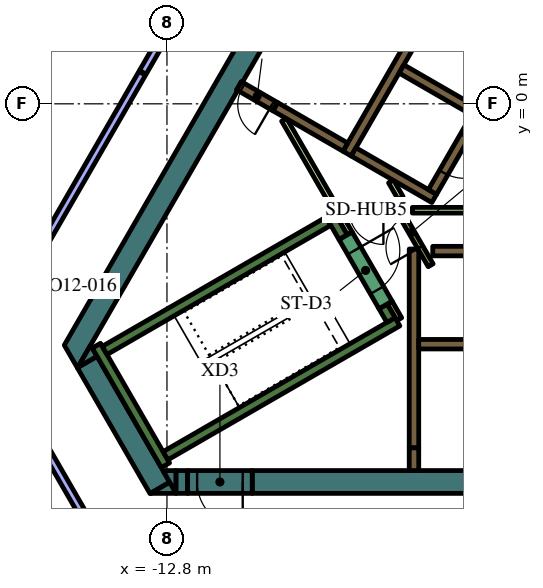
"""IFC4 building model, lengths in metres.
Left out: names, types, materials, properties, quantities, classifications, styles, units other than length and angle.
Written with IfcOpenShell. Run it as: python <this file> out.ifc"""

import sys

from ifc_helpers import new_model, si_unit, direction, frame, frame_2d, origin, place, context, subcontext, project, spatial, polyline, rectangle, outline, extrude, element, fill, save


model = new_model("IFC4")
c1 = context("Model", 3, precision=1e-05, world=origin(), true_north=direction((0.0, 1.0)))
c2 = subcontext(c1, "Body", "Model", "MODEL_VIEW")
j1 = project(units=[si_unit("LENGTHUNIT", "METRE"), si_unit("PLANEANGLEUNIT", "RADIAN")], contexts=[c1])
p1 = place(None, origin())
s1 = spatial("IfcSite", under=j1, at=p1, CompositionType="ELEMENT")
p2 = place(p1, origin())
s2 = spatial("IfcBuilding", under=s1, at=p2, CompositionType="ELEMENT")
p3 = place(p2, frame((0.0, 0.0, 288.0)))
s3 = spatial("IfcBuildingStorey", under=s2, at=p3, CompositionType="ELEMENT", Elevation=288.0)
p4 = place(p3, origin())
e1 = element("IfcWall", 1, at=p4, inside=s3, PredefinedType="SOLIDWALL", context=c2, shape_type="SweptSolid", body=[
    extrude(outline(polyline([(-15.502, -6.35), (-4.912, 11.992), (-4.393, 11.692), (-10.815, 0.569), (-10.84, 0.583), (-10.84, 0.583), (-10.84, 0.583), (-10.965, 0.367), (-10.965, 0.367), (-10.965, 0.367), (-10.94, 0.352), (-11.033, 0.191), (-14.809, -6.35), (-15.156, -6.95), (-15.502, -6.35)])), origin(), (0.0, 0.0, 1.0), 4.2),
])
p5 = place(p3, frame((-14.899, -6.795, 0.0), z_axis=(0.0, 0.0, 1.0), x_axis=(0.499950938802, -0.866053727428, 0.0)))
e2 = element("IfcWall", 2, at=p5, inside=s3, PredefinedType="SOLIDWALL", context=c2, shape_type="SweptSolid", body=[
    extrude(rectangle(XDim=3.823, YDim=0.6, at=frame_2d((1.912, 0.0))), origin(), (0.0, 0.0, 1.0), 4.2),
])
e3 = element("IfcWall", 3, at=p4, inside=s3, PredefinedType="SOLIDWALL", context=c2, shape_type="SweptSolid", body=[
    extrude(outline(polyline([(-14.64, -6.643), (-15.147, -6.936), (-14.809, -6.35), (-14.64, -6.643)])), origin(), (0.0, 0.0, 1.0), 4.2),
])
e4 = element("IfcWall", 4, at=p4, inside=s3, PredefinedType="SOLIDWALL", context=c2, shape_type="SweptSolid", body=[
    extrude(outline(polyline([(-12.557, -10.25), (-13.233, -10.25), (-12.726, -9.957), (-12.557, -10.25)])), origin(), (0.0, 0.0, 1.0), 4.2),
])
p6 = place(p3, frame((-12.257, -9.95, 0.0), z_axis=(0.0, 0.0, 1.0), x_axis=(-1.0, 0.0, 0.0)))
e5 = element("IfcWall", 5, at=p6, inside=s3, PredefinedType="SOLIDWALL", context=c2, shape_type="SweptSolid", body=[
    extrude(rectangle(XDim=0.307, YDim=0.6, at=frame_2d((0.154, 0.0))), origin(), (0.0, 0.0, 1.0), 4.2),
])
e6 = element("IfcWall", 6, at=p4, inside=s3, PredefinedType="SOLIDWALL", context=c2, shape_type="SweptSolid", body=[
    extrude(outline(polyline([(-12.904, -9.65), (-12.566, -9.65), (-12.566, -10.236), (-12.904, -9.65)])), origin(), (0.0, 0.0, 1.0), 4.2),
])
p7 = place(p3, frame((-10.556, -9.95, 0.0), z_axis=(0.0, 0.0, 1.0), x_axis=(1.0, 0.0, 0.0)))
e7 = element("IfcWall", 7, at=p7, inside=s3, PredefinedType="SOLIDWALL", context=c2, shape_type="SweptSolid", body=[
    extrude(rectangle(XDim=19.461, YDim=0.6, at=frame_2d((9.73, 0.0))), origin(), (0.0, 0.0, 1.0), 4.2),
])
p8 = place(p3, frame((-12.84, -9.511, 0.0), z_axis=(0.0, 0.0, 1.0), x_axis=(-0.499997733992, 0.866026712061, 0.0)))
e8 = element("IfcWall", 8, at=p8, inside=s3, PredefinedType="SOLIDWALL", context=c2, shape_type="SweptSolid", body=[
    extrude(rectangle(XDim=3.634, YDim=0.25, at=frame_2d((1.817, 0.0))), origin(), (0.0, 0.0, 1.0), 4.2),
])
p9 = place(p3, frame((-14.44, -6.49, 0.0), z_axis=(0.0, 0.0, 1.0), x_axis=(0.866022966069, 0.500004222222, 0.0)))
e9 = element("IfcWall", 9, at=p9, inside=s3, PredefinedType="SOLIDWALL", context=c2, shape_type="SweptSolid", body=[
    extrude(rectangle(XDim=6.8, YDim=0.25, at=frame_2d((3.4, 0.0))), origin(), (0.0, 0.0, 1.0), 4.2),
])
p10 = place(p3, frame((-8.163, -3.511, 0.0), z_axis=(0.0, 0.0, 1.0), x_axis=(-0.499994068514, 0.866028828302, 0.0)))
e10 = element("IfcWall", 10, at=p10, inside=s3, PredefinedType="SOLIDWALL", context=c2, shape_type="SweptSolid", body=[
    extrude(rectangle(XDim=0.674, YDim=0.25, at=frame_2d((0.337, 0.0))), origin(), (0.0, 0.0, 1.0), 4.2),
])
p11 = place(p3, frame((-12.84, -9.261, 0.0), z_axis=(0.0, 0.0, 1.0), x_axis=(0.866016039709, 0.500016218704, 0.0)))
e11 = element("IfcWall", 11, at=p11, inside=s3, PredefinedType="SOLIDWALL", context=c2, shape_type="SweptSolid", body=[
    extrude(rectangle(XDim=7.05, YDim=0.25, at=frame_2d((3.525, 0.0))), origin(), (0.0, 0.0, 1.0), 4.2),
])
p12 = place(p3, frame((-6.905, -5.69, 0.0), z_axis=(0.0, 0.0, 1.0), x_axis=(-0.499993700073, 0.866029041019, 0.0)))
e12 = element("IfcWall", 12, at=p12, inside=s3, PredefinedType="SOLIDWALL", context=c2, shape_type="SweptSolid", body=[
    extrude(rectangle(XDim=0.416, YDim=0.25, at=frame_2d((0.208, 0.0))), origin(), (0.0, 0.0, 1.0), 4.2),
])
p13 = place(p3, frame((-5.806, -3.875, 0.0), z_axis=(0.0, 0.0, 1.0), x_axis=(1.0, 0.0, 0.0)))
e13 = element("IfcWall", 13, at=p13, inside=s3, PredefinedType="SOLIDWALL", context=c2, shape_type="SweptSolid", body=[
    extrude(rectangle(XDim=12.231, YDim=0.25, at=frame_2d((6.116, 0.0))), origin(), (0.0, 0.0, 1.0), 4.2),
])
p14 = place(p3, frame((-6.3, -9.05, 0.0), z_axis=(0.0, 0.0, 1.0), x_axis=(0.0, 1.0, 0.0)))
e14 = element("IfcWall", 14, at=p14, inside=s3, PredefinedType="SOLIDWALL", context=c2, shape_type="SweptSolid", body=[
    extrude(rectangle(XDim=5.23, YDim=0.25, at=frame_2d((2.615, 0.0))), origin(), (0.0, 0.0, 1.0), 4.2),
])
p15 = place(p3, frame((-6.3, -9.052, 0.0), z_axis=(0.0, 0.0, 1.0), x_axis=(0.0, -1.0, 0.0)))
e15 = element("IfcWall", 15, at=p15, inside=s3, PredefinedType="SOLIDWALL", context=c2, shape_type="SweptSolid", body=[
    extrude(rectangle(XDim=0.598, YDim=0.25, at=frame_2d((0.299, 0.0))), origin(), (0.0, 0.0, 1.0), 4.2),
])
p16 = place(p3, frame((-8.06, -1.311, 0.0), z_axis=(0.0, 0.0, 1.0), x_axis=(0.50000273126, 0.866023826885, 0.0)))
e16 = element("IfcWall", 16, at=p16, inside=s3, PredefinedType="SOLIDWALL", context=c2, shape_type="SweptSolid", body=[
    extrude(rectangle(XDim=10.33, YDim=0.25, at=frame_2d((5.165, 0.0))), origin(), (0.0, 0.0, 1.0), 4.2),
])
p17 = place(p3, frame((-4.724, -0.182, 0.0), z_axis=(0.0, 0.0, 1.0), x_axis=(-0.866008176907, 0.50002983664, 0.0)))
e17 = element("IfcWall", 17, at=p17, inside=s3, PredefinedType="SOLIDWALL", context=c2, shape_type="SweptSolid", body=[
    extrude(rectangle(XDim=2.2, YDim=0.25, at=frame_2d((1.1, 0.0))), origin(), (0.0, 0.0, 1.0), 4.2),
])
p18 = place(p3, frame((-7.889, -1.265, 0.0), z_axis=(0.0, 0.0, 1.0), x_axis=(0.866057815567, -0.499943856944, 0.0)))
e18 = element("IfcWall", 18, at=p18, inside=s3, PredefinedType="SOLIDWALL", context=c2, shape_type="SweptSolid", body=[
    extrude(rectangle(XDim=2.45, YDim=0.25, at=frame_2d((1.225, 0.0))), origin(), (0.0, 0.0, 1.0), 4.2),
])
p19 = place(p3, frame((-9.95, -0.075, 0.0), z_axis=(0.0, 0.0, 1.0), x_axis=(0.865962177421, -0.500109495288, 0.0)))
e19 = element("IfcWall", 19, at=p19, inside=s3, PredefinedType="SOLIDWALL", context=c2, shape_type="SweptSolid", body=[
    extrude(rectangle(XDim=2.129, YDim=0.25, at=frame_2d((1.065, 0.0))), origin(), (0.0, 0.0, 1.0), 4.2),
])
p20 = place(p3, frame((-9.718, -0.417, 0.0), z_axis=(0.0, 0.0, 1.0), x_axis=(0.499966538646, -0.866044721844, 0.0)))
e20 = element("IfcWall", 20, at=p20, inside=s3, PredefinedType="PARTITIONING", context=c2, shape_type="SweptSolid", body=[
    extrude(rectangle(XDim=2.511, YDim=0.15, at=frame_2d((1.255, 0.0))), origin(), (0.0, 0.0, 1.0), 3.55),
])
p21 = place(p3, frame((1.438, -2.8, 0.0), z_axis=(0.0, 0.0, 1.0), x_axis=(-1.0, 0.0, 0.0)))
e21 = element("IfcWall", 21, at=p21, inside=s3, PredefinedType="PARTITIONING", context=c2, shape_type="SweptSolid", body=[
    extrude(rectangle(XDim=7.781, YDim=0.15, at=frame_2d((3.891, 0.0))), origin(), (0.0, 0.0, 1.0), 3.55),
])
p22 = place(p3, frame((-6.653, -2.477, 0.0), z_axis=(0.0, 0.0, 1.0), x_axis=(-0.500002592159, 0.866023907196, 0.0)))
e22 = element("IfcWall", 22, at=p22, inside=s3, PredefinedType="PARTITIONING", context=c2, shape_type="SweptSolid", body=[
    extrude(rectangle(XDim=0.503, YDim=0.15, at=frame_2d((0.251, 0.0))), origin(), (0.0, 0.0, 1.0), 3.55),
])
p23 = place(p3, frame((-7.99, -3.412, 0.0), z_axis=(0.0, 0.0, 1.0), x_axis=(-0.499858525911, 0.866107068482, 0.0)))
e23 = element("IfcWall", 23, at=p23, inside=s3, PredefinedType="PARTITIONING", context=c2, shape_type="SweptSolid", body=[
    extrude(rectangle(XDim=0.466, YDim=0.15, at=frame_2d((0.233, 0.0))), origin(), (0.0, 0.0, 1.0), 3.55),
])
p24 = place(p3, frame((-6.94, -5.23, 0.0), z_axis=(0.0, 0.0, 1.0), x_axis=(0.499834152157, -0.86612113491, 0.0)))
e24 = element("IfcWall", 24, at=p24, inside=s3, PredefinedType="PARTITIONING", context=c2, shape_type="SweptSolid", body=[
    extrude(rectangle(XDim=0.505, YDim=0.15, at=frame_2d((0.252, 0.0))), origin(), (0.0, 0.0, 1.0), 4.2),
])
p25 = place(p3, frame((-6.175, -6.325, 0.0), z_axis=(0.0, 0.0, 1.0), x_axis=(1.0, 0.0, 0.0)))
e25 = element("IfcWall", 25, at=p25, inside=s3, PredefinedType="SOLIDWALL", context=c2, shape_type="SweptSolid", body=[
    extrude(rectangle(XDim=12.35, YDim=0.25, at=frame_2d((6.175, 0.0))), origin(), (0.0, 0.0, 1.0), 4.2),
])
p26 = place(p25, frame((3.205, 0.0, 0.0)))
e26 = element("IfcOpeningElement", 26, at=p26, cuts=e25, PredefinedType="OPENING", context=c2, shape_type="SweptSolid", body=[
    extrude(rectangle(XDim=0.9, YDim=2.1, at=frame_2d((0.45, 1.05))), frame((0.0, 0.135, 0.0), z_axis=(0.0, -1.0, 0.0), x_axis=(1.0, 0.0, 0.0)), (0.0, 0.0, 1.0), 0.27),
])
p27 = place(p25, frame((8.145, 0.0, 0.0)))
e27 = element("IfcOpeningElement", 27, at=p27, cuts=e25, PredefinedType="OPENING", context=c2, shape_type="SweptSolid", body=[
    extrude(rectangle(XDim=1.1, YDim=2.1, at=frame_2d((0.55, 1.05))), frame((0.0, 0.135, 0.0), z_axis=(0.0, -1.0, 0.0), x_axis=(1.0, 0.0, 0.0)), (0.0, 0.0, 1.0), 0.27),
])
p28 = place(p25, frame((10.665, 0.0, 0.0)))
e28 = element("IfcOpeningElement", 28, at=p28, cuts=e25, PredefinedType="OPENING", context=c2, shape_type="SweptSolid", body=[
    extrude(rectangle(XDim=1.1, YDim=2.1, at=frame_2d((0.55, 1.05))), frame((0.0, 0.135, 0.0), z_axis=(0.0, -1.0, 0.0), x_axis=(1.0, 0.0, 0.0)), (0.0, 0.0, 1.0), 0.27),
])
p29 = place(p3, frame((-0.898, 6.194, 0.0), z_axis=(0.0, 0.0, 1.0), x_axis=(-0.499996202215, -0.866027596426, 0.0)))
e29 = element("IfcWall", 29, at=p29, inside=s3, PredefinedType="SOLIDWALL", context=c2, shape_type="SweptSolid", body=[
    extrude(rectangle(XDim=9.83, YDim=0.25, at=frame_2d((4.915, 0.0))), origin(), (0.0, 0.0, 1.0), 4.2),
])
p30 = place(p29, frame((0.585, 0.0, 0.0)))
e30 = element("IfcOpeningElement", 30, at=p30, cuts=e29, PredefinedType="OPENING", context=c2, shape_type="SweptSolid", body=[
    extrude(rectangle(XDim=1.1, YDim=2.1, at=frame_2d((0.55, 1.05))), frame((0.0, 0.135, 0.0), z_axis=(0.0, -1.0, 0.0), x_axis=(1.0, 0.0, 0.0)), (0.0, 0.0, 1.0), 0.27),
])
p31 = place(p29, frame((3.105, 0.0, 0.0)))
e31 = element("IfcOpeningElement", 31, at=p31, cuts=e29, PredefinedType="OPENING", context=c2, shape_type="SweptSolid", body=[
    extrude(rectangle(XDim=1.1, YDim=2.1, at=frame_2d((0.55, 1.05))), frame((0.0, 0.135, 0.0), z_axis=(0.0, -1.0, 0.0), x_axis=(1.0, 0.0, 0.0)), (0.0, 0.0, 1.0), 0.27),
])
p32 = place(p29, frame((5.625, 0.0, 0.0)))
e32 = element("IfcOpeningElement", 32, at=p32, cuts=e29, PredefinedType="OPENING", context=c2, shape_type="SweptSolid", body=[
    extrude(rectangle(XDim=1.1, YDim=2.1, at=frame_2d((0.55, 1.05))), frame((0.0, 0.135, 0.0), z_axis=(0.0, -1.0, 0.0), x_axis=(1.0, 0.0, 0.0)), (0.0, 0.0, 1.0), 0.27),
])
p33 = place(p29, frame((8.145, 0.0, 0.0)))
e33 = element("IfcOpeningElement", 33, at=p33, cuts=e29, PredefinedType="OPENING", context=c2, shape_type="SweptSolid", body=[
    extrude(rectangle(XDim=1.1, YDim=2.1, at=frame_2d((0.55, 1.05))), frame((0.0, 0.135, 0.0), z_axis=(0.0, -1.0, 0.0), x_axis=(1.0, 0.0, 0.0)), (0.0, 0.0, 1.0), 0.27),
])
p34 = place(p3, frame((-8.098, -3.474, 0.0), z_axis=(0.0, 0.0, 1.0), x_axis=(0.49994051562, -0.866059744384, 0.0)))
e34 = element("IfcWall", 34, at=p34, inside=s3, PredefinedType="SOLIDWALL", context=c2, shape_type="SweptSolid", body=[
    extrude(rectangle(XDim=2.1, YDim=0.4, at=frame_2d((1.05, 0.0))), origin(), (0.0, 0.0, 1.0), 4.2),
])
p35 = place(p34, frame((0.45, 0.0, 0.0)))
e35 = element("IfcOpeningElement", 35, at=p35, cuts=e34, PredefinedType="OPENING", context=c2, shape_type="SweptSolid", body=[
    extrude(rectangle(XDim=1.2, YDim=2.1, at=frame_2d((0.6, 1.05))), frame((0.0, 0.21, 0.0), z_axis=(0.0, -1.0, 0.0), x_axis=(1.0, 0.0, 0.0)), (0.0, 0.0, 1.0), 0.42),
])
p36 = place(p3, frame((-5.861, -4.248, 0.0), z_axis=(0.0, 0.0, 1.0), x_axis=(-0.500043646338, 0.866000203093, 0.0)))
e36 = element("IfcWall", 36, at=p36, inside=s3, PredefinedType="PARTITIONING", context=c2, shape_type="SweptSolid", body=[
    extrude(rectangle(XDim=1.93, YDim=0.15, at=frame_2d((0.965, 0.0))), origin(), (0.0, 0.0, 1.0), 4.2),
])
p37 = place(p36, frame((0.55, 0.0, 0.0)))
e37 = element("IfcOpeningElement", 37, at=p37, cuts=e36, PredefinedType="OPENING", context=c2, shape_type="SweptSolid", body=[
    extrude(rectangle(XDim=0.9, YDim=2.1, at=frame_2d((0.45, 1.05))), frame((0.0, 0.085, 0.0), z_axis=(0.0, -1.0, 0.0), x_axis=(1.0, 0.0, 0.0)), (0.0, 0.0, 1.0), 0.17),
])
p38 = place(p3, frame((-10.556, -9.95, 0.0), z_axis=(0.0, 0.0, 1.0), x_axis=(-1.0, 0.0, 0.0)))
e38 = element("IfcWall", 38, at=p38, inside=s3, PredefinedType="SOLIDWALL", context=c2, shape_type="SweptSolid", body=[
    extrude(rectangle(XDim=1.7, YDim=0.6, at=frame_2d((0.85, 0.0))), origin(), (0.0, 0.0, 1.0), 4.2),
])
p39 = place(p38, frame((0.25, 0.0, 0.0)))
e39 = element("IfcOpeningElement", 39, at=p39, cuts=e38, PredefinedType="OPENING", context=c2, shape_type="SweptSolid", body=[
    extrude(rectangle(XDim=1.2, YDim=2.1, at=frame_2d((0.6, 1.05))), frame((0.0, 0.31, 0.0), z_axis=(0.0, -1.0, 0.0), x_axis=(1.0, 0.0, 0.0)), (0.0, 0.0, 1.0), 0.62),
])
p40 = place(p3, frame((-6.655, -2.8, 0.0), z_axis=(0.0, 0.0, 1.0), x_axis=(-1.0, 0.0, 0.0)))
e40 = element("IfcWall", 40, at=p40, inside=s3, PredefinedType="PARTITIONING", context=c2, shape_type="SweptSolid", body=[
    extrude(rectangle(XDim=1.8, YDim=0.15, at=frame_2d((0.9, 0.0))), origin(), (0.0, 0.0, 1.0), 3.55),
])
p41 = place(p40, frame((0.45, 0.0, 0.0)))
e41 = element("IfcOpeningElement", 41, at=p41, cuts=e40, PredefinedType="OPENING", context=c2, shape_type="SweptSolid", body=[
    extrude(rectangle(XDim=0.9, YDim=2.1, at=frame_2d((0.45, 1.05))), frame((0.0, 0.085, 0.0), z_axis=(0.0, -1.0, 0.0), x_axis=(1.0, 0.0, 0.0)), (0.0, 0.0, 1.0), 0.17),
])
p42 = place(p3, frame((-9.95, -0.075, 0.0), z_axis=(0.0, 0.0, 1.0), x_axis=(-0.865952669392, 0.500125958508, 0.0)))
e42 = element("IfcWall", 42, at=p42, inside=s3, PredefinedType="SOLIDWALL", context=c2, shape_type="SweptSolid", body=[
    extrude(rectangle(XDim=1.1, YDim=0.25, at=frame_2d((0.55, 0.0))), origin(), (0.0, 0.0, 1.0), 4.2),
])
p43 = place(p42, frame((0.1, 0.0, 0.0)))
e43 = element("IfcOpeningElement", 43, at=p43, cuts=e42, PredefinedType="OPENING", context=c2, shape_type="SweptSolid", body=[
    extrude(rectangle(XDim=0.9, YDim=2.1, at=frame_2d((0.45, 1.05))), frame((0.0, 0.135, 0.0), z_axis=(0.0, -1.0, 0.0), x_axis=(1.0, 0.0, 0.0)), (0.0, 0.0, 1.0), 0.27),
])
p44 = place(p3, frame((-17.497, -0.613, 0.0), z_axis=(0.0, 0.0, 1.0), x_axis=(0.447480081559, 0.89429389834, 0.0)))
e44 = element("IfcWall", 44, at=p44, inside=s3, PredefinedType="PARTITIONING", context=c2, shape_type="SweptSolid", body=[
    extrude(rectangle(XDim=5.863, YDim=0.15, at=frame_2d((2.931, 0.0))), origin(), (0.0, 0.0, 1.0), 3.55),
])
p45 = place(p44, frame((2.463, 0.0, 0.0)))
e45 = element("IfcOpeningElement", 45, at=p45, cuts=e44, PredefinedType="OPENING", context=c2, shape_type="SweptSolid", body=[
    extrude(rectangle(XDim=0.9, YDim=2.1, at=frame_2d((0.45, 1.05))), frame((0.0, 0.085, 0.0), z_axis=(0.0, -1.0, 0.0), x_axis=(1.0, 0.0, 0.0)), (0.0, 0.0, 1.0), 0.17),
])
p46 = place(p3, frame((-7.436, 11.221, 0.0), z_axis=(0.0, 0.0, 1.0), x_axis=(-0.49999894854, -0.866026010844, 0.0)))
e46 = element("IfcWall", 46, at=p46, inside=s3, PredefinedType="PARTITIONING", context=c2, shape_type="SweptSolid", body=[
    extrude(rectangle(XDim=12.0, YDim=0.2, at=frame_2d((6.0, 0.0))), origin(), (0.0, 0.0, 1.0), 3.55),
])
p47 = place(p46, frame((5.5, 0.0, 0.0)))
e47 = element("IfcOpeningElement", 47, at=p47, cuts=e46, PredefinedType="OPENING", context=c2, shape_type="SweptSolid", body=[
    extrude(rectangle(XDim=1.0, YDim=2.1, at=frame_2d((0.5, 1.05))), frame((0.0, 0.11, 0.0), z_axis=(0.0, -1.0, 0.0), x_axis=(1.0, 0.0, 0.0)), (0.0, 0.0, 1.0), 0.22),
])
p48 = place(p3, frame((-13.451, 0.803, 0.0), z_axis=(0.0, 0.0, 1.0), x_axis=(-0.499982585408, -0.86603545787, 0.0)))
e48 = element("IfcWall", 48, at=p48, inside=s3, PredefinedType="PARTITIONING", context=c2, shape_type="SweptSolid", body=[
    extrude(rectangle(XDim=8.26, YDim=0.2, at=frame_2d((4.13, 0.0))), origin(), (0.0, 0.0, 1.0), 3.55),
])
p49 = place(p3, frame((-17.218, -6.978, 0.0), z_axis=(0.0, 0.0, 1.0), x_axis=(0.500012299885, -0.866018302326, 0.0)))
e49 = element("IfcWall", 49, at=p49, inside=s3, PredefinedType="PARTITIONING", context=c2, shape_type="SweptSolid", body=[
    extrude(rectangle(XDim=5.857, YDim=0.2, at=frame_2d((2.929, 0.0))), origin(), (0.0, 0.0, 1.0), 3.55),
])
p50 = place(p33, origin())
e50 = element("IfcDoor", 50, at=p50, inside=s3, OperationType="DOUBLE_DOOR_SLIDING", PredefinedType="DOOR", context=c2, shape_type="SweptSolid", body=[
    extrude(rectangle(XDim=1.1, YDim=2.1, at=frame_2d((0.55, 1.05))), frame((0.0, 0.025, 0.0), z_axis=(0.0, -1.0, 0.0), x_axis=(1.0, 0.0, 0.0)), (0.0, 0.0, 1.0), 0.05),
])
fill(e33, e50)
p51 = place(p35, origin())
e51 = element("IfcDoor", 51, at=p51, inside=s3, OperationType="SINGLE_SWING_LEFT", PredefinedType="DOOR", context=c2, shape_type="SweptSolid", body=[
    extrude(rectangle(XDim=1.2, YDim=2.1, at=frame_2d((0.6, 1.05))), frame((0.0, 0.025, 0.0), z_axis=(0.0, -1.0, 0.0), x_axis=(1.0, 0.0, 0.0)), (0.0, 0.0, 1.0), 0.05),
])
fill(e35, e51)
p52 = place(p37, origin())
e52 = element("IfcDoor", 52, at=p52, inside=s3, OperationType="SINGLE_SWING_LEFT", PredefinedType="DOOR", context=c2, shape_type="SweptSolid", body=[
    extrude(rectangle(XDim=0.9, YDim=2.1, at=frame_2d((0.45, 1.05))), frame((0.0, 0.025, 0.0), z_axis=(0.0, -1.0, 0.0), x_axis=(1.0, 0.0, 0.0)), (0.0, 0.0, 1.0), 0.05),
])
fill(e37, e52)
p53 = place(p39, origin())
e53 = element("IfcDoor", 53, at=p53, inside=s3, OperationType="SINGLE_SWING_LEFT", PredefinedType="DOOR", context=c2, shape_type="SweptSolid", body=[
    extrude(rectangle(XDim=1.2, YDim=2.1, at=frame_2d((0.6, 1.05))), frame((0.0, 0.025, 0.0), z_axis=(0.0, -1.0, 0.0), x_axis=(1.0, 0.0, 0.0)), (0.0, 0.0, 1.0), 0.05),
])
fill(e39, e53)
p54 = place(p41, origin())
e54 = element("IfcDoor", 54, at=p54, inside=s3, OperationType="SINGLE_SWING_LEFT", PredefinedType="DOOR", context=c2, shape_type="SweptSolid", body=[
    extrude(rectangle(XDim=0.9, YDim=2.1, at=frame_2d((0.45, 1.05))), frame((0.0, 0.025, 0.0), z_axis=(0.0, -1.0, 0.0), x_axis=(1.0, 0.0, 0.0)), (0.0, 0.0, 1.0), 0.05),
])
fill(e41, e54)
p55 = place(p43, origin())
e55 = element("IfcDoor", 55, at=p55, inside=s3, OperationType="SINGLE_SWING_LEFT", PredefinedType="DOOR", context=c2, shape_type="SweptSolid", body=[
    extrude(rectangle(XDim=0.9, YDim=2.1, at=frame_2d((0.45, 1.05))), frame((0.0, 0.025, 0.0), z_axis=(0.0, -1.0, 0.0), x_axis=(1.0, 0.0, 0.0)), (0.0, 0.0, 1.0), 0.05),
])
fill(e43, e55)
save(model, sys.argv[1])
